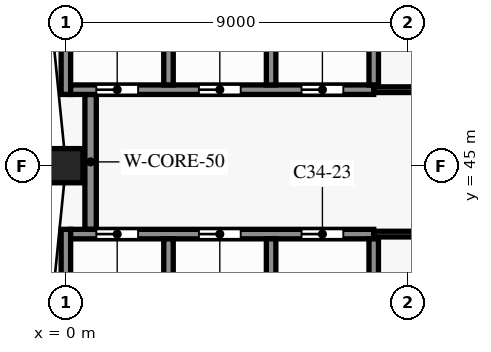
"""IFC4 building model, lengths in metres.
Left out: names, types, materials, properties, quantities, classifications, styles, units other than length and angle.
Written with IfcOpenShell. Run it as: python <this file> out.ifc"""

import sys

from ifc_helpers import new_model, si_unit, direction, frame, frame_2d, origin, origin_2d, place, context, subcontext, project, spatial, rectangle, extrude, element, fill, save


model = new_model("IFC4")
c1 = context("Model", 3, precision=1e-05, world=origin(), true_north=direction((0.0, 1.0)))
c2 = subcontext(c1, "Body", "Model", "MODEL_VIEW")
j1 = project(units=[si_unit("LENGTHUNIT", "METRE"), si_unit("PLANEANGLEUNIT", "RADIAN")], contexts=[c1])
p1 = place(None, origin())
s1 = spatial("IfcSite", under=j1, at=p1, CompositionType="ELEMENT")
p2 = place(p1, origin())
s2 = spatial("IfcBuilding", under=s1, at=p2, CompositionType="ELEMENT")
p3 = place(p2, frame((0.0, 0.0, 252.4)))
s3 = spatial("IfcBuildingStorey", under=s2, at=p3, CompositionType="ELEMENT", Elevation=252.4)
p4 = place(p3, frame((0.0, 45.0, 0.0), z_axis=(0.0, 0.0, 1.0), x_axis=(0.0, -1.0, 0.0)))
e1 = element("IfcColumn", 1, at=p4, inside=s3, PredefinedType="COLUMN", context=c2, shape_type="SweptSolid", body=[
    extrude(rectangle(XDim=0.9, YDim=0.9, at=origin_2d()), origin(), (0.0, 0.0, 1.0), 3.8),
])
p5 = place(p3, frame((8.1, 43.2, 0.0), z_axis=(0.0, 0.0, 1.0), x_axis=(1.0, 0.0, 0.0)))
e2 = element("IfcWall", 2, at=p5, inside=s3, PredefinedType="PARTITIONING", context=c2, shape_type="SweptSolid", body=[
    extrude(rectangle(XDim=16.125, YDim=0.15, at=frame_2d((8.062, 0.0))), origin(), (0.0, 0.0, 1.0), 3.5),
])
p6 = place(p5, frame((5.625, 0.0, 0.0)))
e3 = element("IfcOpeningElement", 3, at=p6, cuts=e2, PredefinedType="OPENING", context=c2, shape_type="SweptSolid", body=[
    extrude(rectangle(XDim=0.9, YDim=2.1, at=frame_2d((0.45, 1.05))), frame((0.0, 0.085, 0.0), z_axis=(0.0, -1.0, 0.0), x_axis=(1.0, 0.0, 0.0)), (0.0, 0.0, 1.0), 0.17),
])
p7 = place(p5, frame((13.725, 0.0, 0.0)))
e4 = element("IfcOpeningElement", 4, at=p7, cuts=e2, PredefinedType="OPENING", context=c2, shape_type="SweptSolid", body=[
    extrude(rectangle(XDim=0.9, YDim=2.1, at=frame_2d((0.45, 1.05))), frame((0.0, 0.085, 0.0), z_axis=(0.0, -1.0, 0.0), x_axis=(1.0, 0.0, 0.0)), (0.0, 0.0, 1.0), 0.17),
])
p8 = place(p3, frame((0.125, 43.2, 0.0), z_axis=(0.0, 0.0, 1.0), x_axis=(1.0, 0.0, 0.0)))
e5 = element("IfcWall", 5, at=p8, inside=s3, PredefinedType="SHEAR", context=c2, shape_type="SweptSolid", body=[
    extrude(rectangle(XDim=7.975, YDim=0.25, at=frame_2d((3.988, 0.0))), origin(), (0.0, 0.0, 1.0), 3.5),
])
p9 = place(p8, frame((0.675, 0.0, 0.0)))
e6 = element("IfcOpeningElement", 6, at=p9, cuts=e5, PredefinedType="OPENING", context=c2, shape_type="SweptSolid", body=[
    extrude(rectangle(XDim=1.1, YDim=2.1, at=frame_2d((0.55, 1.05))), frame((0.0, 0.135, 0.0), z_axis=(0.0, -1.0, 0.0), x_axis=(1.0, 0.0, 0.0)), (0.0, 0.0, 1.0), 0.27),
])
p10 = place(p8, frame((3.375, 0.0, 0.0)))
e7 = element("IfcOpeningElement", 7, at=p10, cuts=e5, PredefinedType="OPENING", context=c2, shape_type="SweptSolid", body=[
    extrude(rectangle(XDim=1.1, YDim=2.1, at=frame_2d((0.55, 1.05))), frame((0.0, 0.135, 0.0), z_axis=(0.0, -1.0, 0.0), x_axis=(1.0, 0.0, 0.0)), (0.0, 0.0, 1.0), 0.27),
])
p11 = place(p8, frame((6.075, 0.0, 0.0)))
e8 = element("IfcOpeningElement", 8, at=p11, cuts=e5, PredefinedType="OPENING", context=c2, shape_type="SweptSolid", body=[
    extrude(rectangle(XDim=1.1, YDim=2.1, at=frame_2d((0.55, 1.05))), frame((0.0, 0.135, 0.0), z_axis=(0.0, -1.0, 0.0), x_axis=(1.0, 0.0, 0.0)), (0.0, 0.0, 1.0), 0.27),
])
p12 = place(p3, frame((8.1, 47.0, 0.0), z_axis=(0.0, 0.0, 1.0), x_axis=(1.0, 0.0, 0.0)))
e9 = element("IfcWall", 9, at=p12, inside=s3, PredefinedType="PARTITIONING", context=c2, shape_type="SweptSolid", body=[
    extrude(rectangle(XDim=13.5, YDim=0.15, at=frame_2d((6.75, 0.0))), origin(), (0.0, 0.0, 1.0), 3.5),
])
p13 = place(p12, frame((4.625, 0.0, 0.0)))
e10 = element("IfcOpeningElement", 10, at=p13, cuts=e9, PredefinedType="OPENING", context=c2, shape_type="SweptSolid", body=[
    extrude(rectangle(XDim=0.9, YDim=2.1, at=frame_2d((0.45, 1.05))), frame((0.0, 0.085, 0.0), z_axis=(0.0, -1.0, 0.0), x_axis=(1.0, 0.0, 0.0)), (0.0, 0.0, 1.0), 0.17),
])
p14 = place(p12, frame((11.375, 0.0, 0.0)))
e11 = element("IfcOpeningElement", 11, at=p14, cuts=e9, PredefinedType="OPENING", context=c2, shape_type="SweptSolid", body=[
    extrude(rectangle(XDim=0.9, YDim=2.1, at=frame_2d((0.45, 1.05))), frame((0.0, 0.085, 0.0), z_axis=(0.0, -1.0, 0.0), x_axis=(1.0, 0.0, 0.0)), (0.0, 0.0, 1.0), 0.17),
])
p15 = place(p3, frame((0.125, 47.0, 0.0), z_axis=(0.0, 0.0, 1.0), x_axis=(1.0, 0.0, 0.0)))
e12 = element("IfcWall", 12, at=p15, inside=s3, PredefinedType="SHEAR", context=c2, shape_type="SweptSolid", body=[
    extrude(rectangle(XDim=7.975, YDim=0.25, at=frame_2d((3.988, 0.0))), origin(), (0.0, 0.0, 1.0), 3.5),
])
p16 = place(p15, frame((0.675, 0.0, 0.0)))
e13 = element("IfcOpeningElement", 13, at=p16, cuts=e12, PredefinedType="OPENING", context=c2, shape_type="SweptSolid", body=[
    extrude(rectangle(XDim=1.1, YDim=2.1, at=frame_2d((0.55, 1.05))), frame((0.0, 0.135, 0.0), z_axis=(0.0, -1.0, 0.0), x_axis=(1.0, 0.0, 0.0)), (0.0, 0.0, 1.0), 0.27),
])
p17 = place(p15, frame((3.375, 0.0, 0.0)))
e14 = element("IfcOpeningElement", 14, at=p17, cuts=e12, PredefinedType="OPENING", context=c2, shape_type="SweptSolid", body=[
    extrude(rectangle(XDim=1.1, YDim=2.1, at=frame_2d((0.55, 1.05))), frame((0.0, 0.135, 0.0), z_axis=(0.0, -1.0, 0.0), x_axis=(1.0, 0.0, 0.0)), (0.0, 0.0, 1.0), 0.27),
])
p18 = place(p15, frame((6.075, 0.0, 0.0)))
e15 = element("IfcOpeningElement", 15, at=p18, cuts=e12, PredefinedType="OPENING", context=c2, shape_type="SweptSolid", body=[
    extrude(rectangle(XDim=1.1, YDim=2.1, at=frame_2d((0.55, 1.05))), frame((0.0, 0.135, 0.0), z_axis=(0.0, -1.0, 0.0), x_axis=(1.0, 0.0, 0.0)), (0.0, 0.0, 1.0), 0.27),
])
p19 = place(p3, frame((0.0, 40.0, 0.0), z_axis=(0.0, 0.0, 1.0), x_axis=(0.0, 1.0, 0.0)))
e16 = element("IfcWall", 16, at=p19, inside=s3, PredefinedType="SHEAR", context=c2, shape_type="SweptSolid", body=[
    extrude(rectangle(XDim=3.325, YDim=0.25, at=frame_2d((1.663, 0.0))), origin(), (0.0, 0.0, 1.0), 3.5),
])
p20 = place(p3, frame((0.0, 46.875, 0.0), z_axis=(0.0, 0.0, 1.0), x_axis=(0.0, 1.0, 0.0)))
e17 = element("IfcWall", 17, at=p20, inside=s3, PredefinedType="SHEAR", context=c2, shape_type="SweptSolid", body=[
    extrude(rectangle(XDim=3.475, YDim=0.25, at=frame_2d((1.738, 0.0))), origin(), (0.0, 0.0, 1.0), 3.5),
])
p21 = place(p3, frame((0.65, 43.325, 0.0), z_axis=(0.0, 0.0, 1.0), x_axis=(0.0, 1.0, 0.0)))
e18 = element("IfcWall", 18, at=p21, inside=s3, PredefinedType="SHEAR", context=c2, shape_type="SweptSolid", body=[
    extrude(rectangle(XDim=3.55, YDim=0.3, at=frame_2d((1.775, 0.0))), origin(), (0.0, 0.0, 1.0), 3.5),
])
for number, where, z_axis, x_axis in (
    (19, (2.7, 40.125, 0.0), (0.0, 0.0, 1.0), (0.0, 1.0, 0.0)),
    (20, (2.7, 47.125, 0.0), (0.0, 0.0, 1.0), (0.0, 1.0, 0.0)),
    (21, (5.4, 40.125, 0.0), (0.0, 0.0, 1.0), (0.0, 1.0, 0.0)),
    (22, (5.4, 47.125, 0.0), (0.0, 0.0, 1.0), (0.0, 1.0, 0.0)),
    (23, (8.1, 40.125, 0.0), (0.0, 0.0, 1.0), (0.0, 1.0, 0.0)),
):
    element("IfcWall", number, at=place(p3, frame(where, z_axis=z_axis, x_axis=x_axis)), inside=s3, PredefinedType="SHEAR", context=c2, shape_type="SweptSolid", body=[
        extrude(rectangle(XDim=2.95, YDim=0.25, at=frame_2d((1.475, 0.0))), origin(), (0.0, 0.0, 1.0), 3.5),
    ])
p22 = place(p3, frame((8.1, 47.125, 0.0), z_axis=(0.0, 0.0, 1.0), x_axis=(0.0, 1.0, 0.0)))
e24 = element("IfcWall", 24, at=p22, inside=s3, PredefinedType="SHEAR", context=c2, shape_type="SweptSolid", body=[
    extrude(rectangle(XDim=3.075, YDim=0.25, at=frame_2d((1.538, 0.0))), origin(), (0.0, 0.0, 1.0), 3.5),
])
p23 = place(p9, origin())
e25 = element("IfcDoor", 25, at=p23, inside=s3, OperationType="DOUBLE_DOOR_SLIDING", PredefinedType="DOOR", context=c2, shape_type="SweptSolid", body=[
    extrude(rectangle(XDim=1.1, YDim=2.1, at=frame_2d((0.55, 1.05))), frame((0.0, 0.025, 0.0), z_axis=(0.0, -1.0, 0.0), x_axis=(1.0, 0.0, 0.0)), (0.0, 0.0, 1.0), 0.05),
])
fill(e6, e25)
p24 = place(p10, origin())
e26 = element("IfcDoor", 26, at=p24, inside=s3, OperationType="DOUBLE_DOOR_SLIDING", PredefinedType="DOOR", context=c2, shape_type="SweptSolid", body=[
    extrude(rectangle(XDim=1.1, YDim=2.1, at=frame_2d((0.55, 1.05))), frame((0.0, 0.025, 0.0), z_axis=(0.0, -1.0, 0.0), x_axis=(1.0, 0.0, 0.0)), (0.0, 0.0, 1.0), 0.05),
])
fill(e7, e26)
p25 = place(p11, origin())
e27 = element("IfcDoor", 27, at=p25, inside=s3, OperationType="DOUBLE_DOOR_SLIDING", PredefinedType="DOOR", context=c2, shape_type="SweptSolid", body=[
    extrude(rectangle(XDim=1.1, YDim=2.1, at=frame_2d((0.55, 1.05))), frame((0.0, 0.025, 0.0), z_axis=(0.0, -1.0, 0.0), x_axis=(1.0, 0.0, 0.0)), (0.0, 0.0, 1.0), 0.05),
])
fill(e8, e27)
p26 = place(p16, origin())
e28 = element("IfcDoor", 28, at=p26, inside=s3, OperationType="DOUBLE_DOOR_SLIDING", PredefinedType="DOOR", context=c2, shape_type="SweptSolid", body=[
    extrude(rectangle(XDim=1.1, YDim=2.1, at=frame_2d((0.55, 1.05))), frame((0.0, 0.025, 0.0), z_axis=(0.0, -1.0, 0.0), x_axis=(1.0, 0.0, 0.0)), (0.0, 0.0, 1.0), 0.05),
])
fill(e13, e28)
p27 = place(p17, origin())
e29 = element("IfcDoor", 29, at=p27, inside=s3, OperationType="DOUBLE_DOOR_SLIDING", PredefinedType="DOOR", context=c2, shape_type="SweptSolid", body=[
    extrude(rectangle(XDim=1.1, YDim=2.1, at=frame_2d((0.55, 1.05))), frame((0.0, 0.025, 0.0), z_axis=(0.0, -1.0, 0.0), x_axis=(1.0, 0.0, 0.0)), (0.0, 0.0, 1.0), 0.05),
])
fill(e14, e29)
p28 = place(p18, origin())
e30 = element("IfcDoor", 30, at=p28, inside=s3, OperationType="DOUBLE_DOOR_SLIDING", PredefinedType="DOOR", context=c2, shape_type="SweptSolid", body=[
    extrude(rectangle(XDim=1.1, YDim=2.1, at=frame_2d((0.55, 1.05))), frame((0.0, 0.025, 0.0), z_axis=(0.0, -1.0, 0.0), x_axis=(1.0, 0.0, 0.0)), (0.0, 0.0, 1.0), 0.05),
])
fill(e15, e30)
save(model, sys.argv[1])
